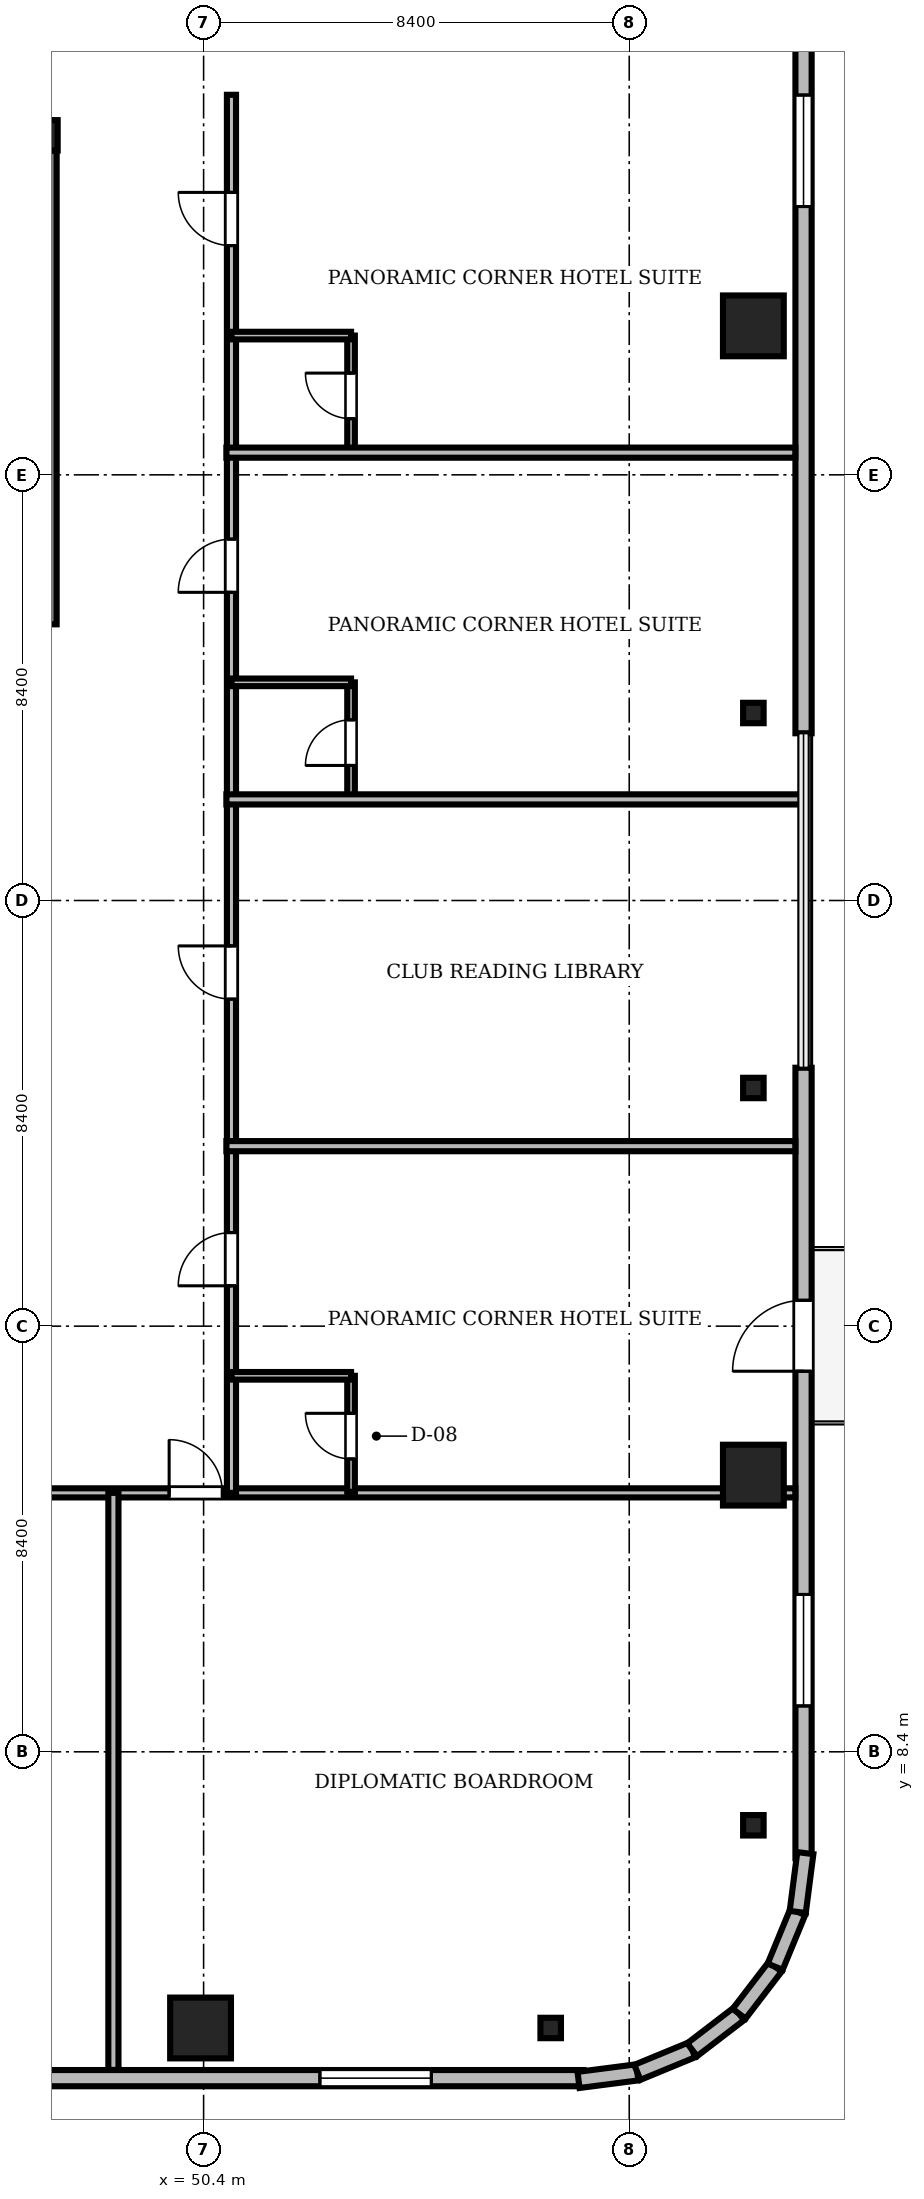
"""IFC4 building model, lengths in metres.
Left out: names, types, materials, properties, quantities, classifications, styles, units other than length and angle.
Written with IfcOpenShell. Run it as: python <this file> out.ifc"""

import sys

from ifc_helpers import new_model, si_unit, direction, frame, frame_2d, origin, origin_2d, place, context, subcontext, project, spatial, rectangle, i_section, extrude, source, transform, mapped, element, fill, save


model = new_model("IFC4")
c1 = context("Model", 3, precision=1e-05, world=origin(), true_north=direction((0.0, 1.0)))
c2 = subcontext(c1, "Body", "Model", "MODEL_VIEW")
j1 = project(units=[si_unit("LENGTHUNIT", "METRE"), si_unit("PLANEANGLEUNIT", "RADIAN")], contexts=[c1])
p1 = place(None, origin())
s1 = spatial("IfcSite", under=j1, at=p1, CompositionType="ELEMENT")
p2 = place(p1, origin())
s2 = spatial("IfcBuilding", under=s1, at=p2, CompositionType="ELEMENT")
p3 = place(p2, frame((0.0, 0.0, 246.65)))
s3 = spatial("IfcBuildingStorey", under=s2, at=p3, CompositionType="ELEMENT", Elevation=246.65)
m1 = source(origin(), c2, "Body", "SweptSolid", [
    extrude(i_section(OverallWidth=0.3, OverallDepth=0.6, WebThickness=0.015, FlangeThickness=0.03, FilletRadius=0.027, at=origin_2d()), origin(), (0.0, 0.0, 1.0), 3.73),
])
p4 = place(p3, frame((47.37, 40.3, 0.0), z_axis=(0.0, 0.0, 1.0), x_axis=(1.0, 0.0, 0.0)))
e1 = element("IfcColumn", 1, at=p4, inside=s3, PredefinedType="COLUMN", context=c2, shape_type="MappedRepresentation", body=[
    mapped(m1, transform((0.0, 0.0, 0.0), scale=1.0)),
])
m2 = source(origin(), c2, "Body", "SweptSolid", [
    extrude(rectangle(XDim=1.2, YDim=1.2, at=origin_2d()), origin(), (0.0, 0.0, 1.0), 3.73),
])
for number, where, z_axis, x_axis in (
    (2, (50.34, 2.95, 0.0), (0.0, 0.0, 1.0), (1.0, 0.0, 0.0)),
    (3, (61.25, 13.86, 0.0), (0.0, 0.0, 1.0), (1.0, 0.0, 0.0)),
    (4, (61.25, 36.54, 0.0), (0.0, 0.0, 1.0), (1.0, 0.0, 0.0)),
):
    element("IfcColumn", number, at=place(p3, frame(where, z_axis=z_axis, x_axis=x_axis)), inside=s3, PredefinedType="COLUMN", context=c2, shape_type="MappedRepresentation", body=[
        mapped(m2, transform((0.0, 0.0, 0.0), scale=1.0)),
    ])
m3 = source(origin(), c2, "Body", "SweptSolid", [
    extrude(i_section(OverallWidth=0.405, OverallDepth=0.403, WebThickness=0.018, FlangeThickness=0.028, FilletRadius=0.015, at=origin_2d()), origin(), (0.0, 0.0, 1.0), 3.73),
])
for number, where, z_axis, x_axis in (
    (5, (57.25, 2.95, 0.0), (0.0, 0.0, 1.0), (1.0, 0.0, 0.0)),
    (6, (61.25, 6.95, 0.0), (0.0, 0.0, 1.0), (1.0, 0.0, 0.0)),
    (7, (61.25, 21.5, 0.0), (0.0, 0.0, 1.0), (1.0, 0.0, 0.0)),
    (8, (61.25, 28.9, 0.0), (0.0, 0.0, 1.0), (1.0, 0.0, 0.0)),
):
    element("IfcColumn", number, at=place(p3, frame(where, z_axis=z_axis, x_axis=x_axis)), inside=s3, PredefinedType="COLUMN", context=c2, shape_type="MappedRepresentation", body=[
        mapped(m3, transform((0.0, 0.0, 0.0), scale=1.0)),
    ])
m4 = source(origin(), c2, "Body", "SweptSolid", [
    extrude(rectangle(XDim=15.6, YDim=0.32, at=frame_2d((7.8, 0.0))), origin(), (0.0, 0.0, 1.0), 3.73),
])
p5 = place(p3, frame((42.3, 1.96, 0.0), z_axis=(0.0, 0.0, 1.0), x_axis=(1.0, 0.0, 0.0)))
e9 = element("IfcWall", 9, at=p5, inside=s3, PredefinedType="SOLIDWALL", context=c2, shape_type="MappedRepresentation", body=[
    mapped(m4, transform((0.0, 0.0, 0.0), scale=1.0)),
])
m5 = source(origin(), c2, "Body", "SweptSolid", [
    extrude(rectangle(XDim=2.2, YDim=2.4, at=frame_2d((1.1, 1.2))), frame((0.0, 0.17, 0.0), z_axis=(0.0, -1.0, 0.0), x_axis=(1.0, 0.0, 0.0)), (0.0, 0.0, 1.0), 0.34),
])
p6 = place(p5, frame((10.395, 0.0, 0.72)))
e10 = element("IfcOpeningElement", 10, at=p6, cuts=e9, PredefinedType="OPENING", context=c2, shape_type="MappedRepresentation", body=[
    mapped(m5, transform((0.0, 0.0, 0.0), scale=1.0)),
])
p7 = place(p3, frame((62.24, 6.3, 0.0), z_axis=(0.0, 0.0, 1.0), x_axis=(0.0, 1.0, 0.0)))
e11 = element("IfcWall", 11, at=p7, inside=s3, PredefinedType="SOLIDWALL", context=c2, shape_type="MappedRepresentation", body=[
    mapped(m4, transform((0.0, 0.0, 0.0), scale=1.0)),
])
m6 = source(origin(), c2, "Body", "SweptSolid", [
    extrude(rectangle(XDim=1.4, YDim=2.3, at=frame_2d((0.7, 1.15))), frame((0.0, 0.17, 0.0), z_axis=(0.0, -1.0, 0.0), x_axis=(1.0, 0.0, 0.0)), (0.0, 0.0, 1.0), 0.34),
])
p8 = place(p7, frame((9.61, 0.0, 0.0)))
e12 = element("IfcOpeningElement", 12, at=p8, cuts=e11, PredefinedType="OPENING", context=c2, shape_type="MappedRepresentation", body=[
    mapped(m6, transform((0.0, 0.0, 0.0), scale=1.0)),
])
p9 = place(p7, frame((3.005, 0.0, 0.72)))
e13 = element("IfcOpeningElement", 13, at=p9, cuts=e11, PredefinedType="OPENING", context=c2, shape_type="MappedRepresentation", body=[
    mapped(m5, transform((0.0, 0.0, 0.0), scale=1.0)),
])
m7 = source(origin(), c2, "Body", "SweptSolid", [
    extrude(rectangle(XDim=15.6, YDim=0.32, at=frame_2d((7.8, 0.0))), origin(), (0.0, 0.0, 1.0), 3.73),
])
p10 = place(p3, frame((62.24, 28.5, 0.0), z_axis=(0.0, 0.0, 1.0), x_axis=(0.0, 1.0, 0.0)))
e14 = element("IfcWall", 14, at=p10, inside=s3, PredefinedType="SOLIDWALL", context=c2, shape_type="MappedRepresentation", body=[
    mapped(m7, transform((0.0, 0.0, 0.0), scale=1.0)),
])
p11 = place(p10, frame((10.395, 0.0, 0.72)))
e15 = element("IfcOpeningElement", 15, at=p11, cuts=e14, PredefinedType="OPENING", context=c2, shape_type="MappedRepresentation", body=[
    mapped(m5, transform((0.0, 0.0, 0.0), scale=1.0)),
])
m8 = source(origin(), c2, "Body", "SweptSolid", [
    extrude(rectangle(XDim=1.17, YDim=0.32, at=frame_2d((0.585, 0.0))), origin(), (0.0, 0.0, 1.0), 3.73),
])
p12 = place(p3, frame((57.8, 1.925, 0.0), z_axis=(0.0, 0.0, 1.0), x_axis=(0.991762485493, 0.128090485085, 0.0)))
e16 = element("IfcWall", 16, at=p12, inside=s3, PredefinedType="SOLIDWALL", context=c2, shape_type="MappedRepresentation", body=[
    mapped(m8, transform((0.0, 0.0, 0.0), scale=1.0)),
])
m9 = source(origin(), c2, "Body", "SweptSolid", [
    extrude(rectangle(XDim=1.169, YDim=0.32, at=frame_2d((0.585, 0.0))), origin(), (0.0, 0.0, 1.0), 3.73),
])
p13 = place(p3, frame((58.96, 2.074, 0.0), z_axis=(0.0, 0.0, 1.0), x_axis=(0.924479075121, 0.381232789334, 0.0)))
e17 = element("IfcWall", 17, at=p13, inside=s3, PredefinedType="SOLIDWALL", context=c2, shape_type="MappedRepresentation", body=[
    mapped(m9, transform((0.0, 0.0, 0.0), scale=1.0)),
])
m10 = source(origin(), c2, "Body", "SweptSolid", [
    extrude(rectangle(XDim=1.169, YDim=0.32, at=frame_2d((0.584, 0.0))), origin(), (0.0, 0.0, 1.0), 3.73),
])
p14 = place(p3, frame((60.041, 2.52, 0.0), z_axis=(0.0, 0.0, 1.0), x_axis=(0.793663520347, 0.608356981114, 0.0)))
e18 = element("IfcWall", 18, at=p14, inside=s3, PredefinedType="SOLIDWALL", context=c2, shape_type="MappedRepresentation", body=[
    mapped(m10, transform((0.0, 0.0, 0.0), scale=1.0)),
])
m11 = source(origin(), c2, "Body", "SweptSolid", [
    extrude(rectangle(XDim=1.169, YDim=0.32, at=frame_2d((0.584, 0.0))), origin(), (0.0, 0.0, 1.0), 3.73),
])
for number, where, z_axis, x_axis in (
    (19, (60.969, 3.231, 0.0), (0.0, 0.0, 1.0), (0.608, 0.794, 0.0)),
    (20, (61.68, 4.159, 0.0), (0.0, 0.0, 1.0), (0.381, 0.925, 0.0)),
):
    element("IfcWall", number, at=place(p3, frame(where, z_axis=z_axis, x_axis=x_axis)), inside=s3, PredefinedType="SOLIDWALL", context=c2, shape_type="MappedRepresentation", body=[
        mapped(m11, transform((0.0, 0.0, 0.0), scale=1.0)),
    ])
m12 = source(origin(), c2, "Body", "SweptSolid", [
    extrude(rectangle(XDim=1.171, YDim=0.32, at=frame_2d((0.585, 0.0))), origin(), (0.0, 0.0, 1.0), 3.73),
])
p15 = place(p3, frame((62.125, 5.24, 0.0), z_axis=(0.0, 0.0, 1.0), x_axis=(0.128269133229, 0.991739395941, 0.0)))
e21 = element("IfcWall", 21, at=p15, inside=s3, PredefinedType="SOLIDWALL", context=c2, shape_type="MappedRepresentation", body=[
    mapped(m12, transform((0.0, 0.0, 0.0), scale=1.0)),
])
m13 = source(origin(), c2, "Body", "SweptSolid", [
    extrude(rectangle(XDim=9.35, YDim=0.25, at=frame_2d((4.675, 0.0))), origin(), (0.0, 0.0, 1.0), 3.75),
])
p16 = place(p3, frame((47.375, 30.65, 0.0), z_axis=(0.0, 0.0, 1.0), x_axis=(0.0, 1.0, 0.0)))
e22 = element("IfcWall", 22, at=p16, inside=s3, PredefinedType="SOLIDWALL", context=c2, shape_type="MappedRepresentation", body=[
    mapped(m13, transform((0.0, 0.0, 0.0), scale=1.0)),
])
m14 = source(origin(), c2, "Body", "SweptSolid", [
    extrude(rectangle(XDim=46.156, YDim=0.18, at=frame_2d((23.078, 0.0))), origin(), (0.0, 0.0, 1.0), 2.972),
])
p17 = place(p3, frame((15.922, 13.51, 0.0), z_axis=(0.0, 0.0, 1.0), x_axis=(1.0, 0.0, 0.0)))
e23 = element("IfcWall", 23, at=p17, inside=s3, PredefinedType="PARTITIONING", context=c2, shape_type="MappedRepresentation", body=[
    mapped(m14, transform((0.0, 0.0, 0.0), scale=1.0)),
])
m15 = source(origin(), c2, "Body", "SweptSolid", [
    extrude(rectangle(XDim=1.05, YDim=2.2, at=frame_2d((0.525, 1.1))), frame((0.0, 0.1, 0.0), z_axis=(0.0, -1.0, 0.0), x_axis=(1.0, 0.0, 0.0)), (0.0, 0.0, 1.0), 0.2),
])
p18 = place(p17, frame((7.298, 0.0, 0.0)))
e24 = element("IfcOpeningElement", 24, at=p18, cuts=e23, PredefinedType="OPENING", context=c2, shape_type="MappedRepresentation", body=[
    mapped(m15, transform((0.0, 0.0, 0.0), scale=1.0)),
])
p19 = place(p17, frame((10.384, 0.0, 0.0)))
e25 = element("IfcOpeningElement", 25, at=p19, cuts=e23, PredefinedType="OPENING", context=c2, shape_type="MappedRepresentation", body=[
    mapped(m15, transform((0.0, 0.0, 0.0), scale=1.0)),
])
p20 = place(p17, frame((15.647, 0.0, 0.0)))
e26 = element("IfcOpeningElement", 26, at=p20, cuts=e23, PredefinedType="OPENING", context=c2, shape_type="MappedRepresentation", body=[
    mapped(m15, transform((0.0, 0.0, 0.0), scale=1.0)),
])
p21 = place(p17, frame((21.659, 0.0, 0.0)))
e27 = element("IfcOpeningElement", 27, at=p21, cuts=e23, PredefinedType="OPENING", context=c2, shape_type="MappedRepresentation", body=[
    mapped(m15, transform((0.0, 0.0, 0.0), scale=1.0)),
])
p22 = place(p17, frame((28.422, 0.0, 0.0)))
e28 = element("IfcOpeningElement", 28, at=p22, cuts=e23, PredefinedType="OPENING", context=c2, shape_type="MappedRepresentation", body=[
    mapped(m15, transform((0.0, 0.0, 0.0), scale=1.0)),
])
p23 = place(p17, frame((33.798, 0.0, 0.0)))
e29 = element("IfcOpeningElement", 29, at=p23, cuts=e23, PredefinedType="OPENING", context=c2, shape_type="MappedRepresentation", body=[
    mapped(m15, transform((0.0, 0.0, 0.0), scale=1.0)),
])
m16 = source(origin(), c2, "Body", "SweptSolid", [
    extrude(rectangle(XDim=27.59, YDim=0.18, at=frame_2d((13.795, 0.0))), origin(), (0.0, 0.0, 1.0), 3.172),
])
p24 = place(p3, frame((50.95, 13.51, 0.0), z_axis=(0.0, 0.0, 1.0), x_axis=(0.0, 1.0, 0.0)))
e30 = element("IfcWall", 30, at=p24, inside=s3, PredefinedType="PARTITIONING", context=c2, shape_type="MappedRepresentation", body=[
    mapped(m16, transform((0.0, 0.0, 0.0), scale=1.0)),
])
p25 = place(p24, frame((4.086, 0.0, 0.0)))
e31 = element("IfcOpeningElement", 31, at=p25, cuts=e30, PredefinedType="OPENING", context=c2, shape_type="MappedRepresentation", body=[
    mapped(m15, transform((0.0, 0.0, 0.0), scale=1.0)),
])
p26 = place(p24, frame((9.744, 0.0, 0.0)))
e32 = element("IfcOpeningElement", 32, at=p26, cuts=e30, PredefinedType="OPENING", context=c2, shape_type="MappedRepresentation", body=[
    mapped(m15, transform((0.0, 0.0, 0.0), scale=1.0)),
])
p27 = place(p24, frame((17.771, 0.0, 0.0)))
e33 = element("IfcOpeningElement", 33, at=p27, cuts=e30, PredefinedType="OPENING", context=c2, shape_type="MappedRepresentation", body=[
    mapped(m15, transform((0.0, 0.0, 0.0), scale=1.0)),
])
p28 = place(p24, frame((24.614, 0.0, 0.0)))
e34 = element("IfcOpeningElement", 34, at=p28, cuts=e30, PredefinedType="OPENING", context=c2, shape_type="MappedRepresentation", body=[
    mapped(m15, transform((0.0, 0.0, 0.0), scale=1.0)),
])
m17 = source(origin(), c2, "Body", "SweptSolid", [
    extrude(rectangle(XDim=2.29, YDim=0.15, at=frame_2d((1.145, 0.0))), origin(), (0.0, 0.0, 1.0), 3.172),
])
p29 = place(p3, frame((53.31, 13.53, 0.0), z_axis=(0.0, 0.0, 1.0), x_axis=(0.0, 1.0, 0.0)))
e35 = element("IfcWall", 35, at=p29, inside=s3, PredefinedType="PARTITIONING", context=c2, shape_type="MappedRepresentation", body=[
    mapped(m17, transform((0.0, 0.0, 0.0), scale=1.0)),
])
m18 = source(origin(), c2, "Body", "SweptSolid", [
    extrude(rectangle(XDim=0.9, YDim=2.1, at=frame_2d((0.45, 1.05))), frame((0.0, 0.085, 0.0), z_axis=(0.0, -1.0, 0.0), x_axis=(1.0, 0.0, 0.0)), (0.0, 0.0, 1.0), 0.17),
])
p30 = place(p29, frame((0.65, 0.0, 0.0)))
e36 = element("IfcOpeningElement", 36, at=p30, cuts=e35, PredefinedType="OPENING", context=c2, shape_type="MappedRepresentation", body=[
    mapped(m18, transform((0.0, 0.0, 0.0), scale=1.0)),
])
m19 = source(origin(), c2, "Body", "SweptSolid", [
    extrude(rectangle(XDim=2.29, YDim=0.15, at=frame_2d((1.145, 0.0))), origin(), (0.0, 0.0, 1.0), 3.73),
])
p31 = place(p3, frame((53.31, 27.215, 0.0), z_axis=(0.0, 0.0, 1.0), x_axis=(0.0, 1.0, 0.0)))
e37 = element("IfcWall", 37, at=p31, inside=s3, PredefinedType="PARTITIONING", context=c2, shape_type="MappedRepresentation", body=[
    mapped(m19, transform((0.0, 0.0, 0.0), scale=1.0)),
])
p32 = place(p31, frame((0.65, 0.0, 0.0)))
e38 = element("IfcOpeningElement", 38, at=p32, cuts=e37, PredefinedType="OPENING", context=c2, shape_type="MappedRepresentation", body=[
    mapped(m18, transform((0.0, 0.0, 0.0), scale=1.0)),
])
p33 = place(p3, frame((53.31, 34.058, 0.0), z_axis=(0.0, 0.0, 1.0), x_axis=(0.0, 1.0, 0.0)))
e39 = element("IfcWall", 39, at=p33, inside=s3, PredefinedType="PARTITIONING", context=c2, shape_type="MappedRepresentation", body=[
    mapped(m19, transform((0.0, 0.0, 0.0), scale=1.0)),
])
p34 = place(p33, frame((0.65, 0.0, 0.0)))
e40 = element("IfcOpeningElement", 40, at=p34, cuts=e39, PredefinedType="OPENING", context=c2, shape_type="MappedRepresentation", body=[
    mapped(m18, transform((0.0, 0.0, 0.0), scale=1.0)),
])
m20 = source(origin(), c2, "Body", "SweptSolid", [
    extrude(rectangle(XDim=11.388, YDim=0.2, at=frame_2d((5.694, 0.0))), origin(), (0.0, 0.0, 1.0), 2.972),
])
p35 = place(p3, frame((48.62, 2.122, 0.0), z_axis=(0.0, 0.0, 1.0), x_axis=(0.0, 1.0, 0.0)))
e41 = element("IfcWall", 41, at=p35, inside=s3, PredefinedType="PARTITIONING", context=c2, shape_type="MappedRepresentation", body=[
    mapped(m20, transform((0.0, 0.0, 0.0), scale=1.0)),
])
m21 = source(origin(), c2, "Body", "SweptSolid", [
    extrude(rectangle(XDim=11.228, YDim=0.2, at=frame_2d((5.614, 0.0))), origin(), (0.0, 0.0, 1.0), 2.972),
])
p36 = place(p3, frame((50.85, 20.352, 0.0), z_axis=(0.0, 0.0, 1.0), x_axis=(1.0, 0.0, 0.0)))
e42 = element("IfcWall", 42, at=p36, inside=s3, PredefinedType="PARTITIONING", context=c2, shape_type="MappedRepresentation", body=[
    mapped(m21, transform((0.0, 0.0, 0.0), scale=1.0)),
])
m22 = source(origin(), c2, "Body", "SweptSolid", [
    extrude(rectangle(XDim=11.42, YDim=0.2, at=frame_2d((5.71, 0.0))), origin(), (0.0, 0.0, 1.0), 2.972),
])
p37 = place(p3, frame((50.85, 27.195, 0.0), z_axis=(0.0, 0.0, 1.0), x_axis=(1.0, 0.0, 0.0)))
e43 = element("IfcWall", 43, at=p37, inside=s3, PredefinedType="PARTITIONING", context=c2, shape_type="MappedRepresentation", body=[
    mapped(m22, transform((0.0, 0.0, 0.0), scale=1.0)),
])
p38 = place(p3, frame((50.85, 34.038, 0.0), z_axis=(0.0, 0.0, 1.0), x_axis=(1.0, 0.0, 0.0)))
e44 = element("IfcWall", 44, at=p38, inside=s3, PredefinedType="PARTITIONING", context=c2, shape_type="MappedRepresentation", body=[
    mapped(m21, transform((0.0, 0.0, 0.0), scale=1.0)),
])
m23 = source(origin(), c2, "Body", "SweptSolid", [
    extrude(rectangle(XDim=2.36, YDim=0.15, at=frame_2d((1.18, 0.0))), origin(), (0.0, 0.0, 1.0), 3.73),
])
for number, where, z_axis, x_axis in (
    (45, (50.95, 15.82, 0.0), (0.0, 0.0, 1.0), (1.0, 0.0, 0.0)),
    (46, (50.95, 29.505, 0.0), (0.0, 0.0, 1.0), (1.0, 0.0, 0.0)),
    (47, (50.95, 36.348, 0.0), (0.0, 0.0, 1.0), (1.0, 0.0, 0.0)),
):
    element("IfcWall", number, at=place(p3, frame(where, z_axis=z_axis, x_axis=x_axis)), inside=s3, PredefinedType="PARTITIONING", context=c2, shape_type="MappedRepresentation", body=[
        mapped(m23, transform((0.0, 0.0, 0.0), scale=1.0)),
    ])
m24 = source(origin(), c2, "Body", "SweptSolid", [
    extrude(rectangle(XDim=2.2, YDim=2.4, at=frame_2d((1.1, 1.2))), frame((0.0, 0.03, 0.0), z_axis=(0.0, -1.0, 0.0), x_axis=(1.0, 0.0, 0.0)), (0.0, 0.0, 1.0), 0.06),
])
p39 = place(p6, origin())
e48 = element("IfcWindow", 48, at=p39, inside=s3, PartitioningType="SINGLE_PANEL", PredefinedType="WINDOW", context=c2, shape_type="MappedRepresentation", body=[
    mapped(m24, transform((0.0, 0.0, 0.0), scale=1.0)),
])
fill(e10, e48)
m25 = source(origin(), c2, "Body", "SweptSolid", [
    extrude(rectangle(XDim=1.4, YDim=2.3, at=frame_2d((0.7, 1.15))), frame((0.0, 0.025, 0.0), z_axis=(0.0, -1.0, 0.0), x_axis=(1.0, 0.0, 0.0)), (0.0, 0.0, 1.0), 0.05),
])
p40 = place(p8, frame((1.4, 0.0, 0.0), z_axis=(0.0, 0.0, 1.0), x_axis=(-1.0, 0.0, 0.0)))
e49 = element("IfcDoor", 49, at=p40, inside=s3, OperationType="DOUBLE_DOOR_SLIDING", PredefinedType="DOOR", context=c2, shape_type="MappedRepresentation", body=[
    mapped(m25, transform((0.0, 0.0, 0.0), scale=1.0)),
])
fill(e12, e49)
p41 = place(p9, origin())
e50 = element("IfcWindow", 50, at=p41, inside=s3, PartitioningType="SINGLE_PANEL", PredefinedType="WINDOW", context=c2, shape_type="MappedRepresentation", body=[
    mapped(m24, transform((0.0, 0.0, 0.0), scale=1.0)),
])
fill(e13, e50)
p42 = place(p11, origin())
e51 = element("IfcWindow", 51, at=p42, inside=s3, PartitioningType="SINGLE_PANEL", PredefinedType="WINDOW", context=c2, shape_type="MappedRepresentation", body=[
    mapped(m24, transform((0.0, 0.0, 0.0), scale=1.0)),
])
fill(e15, e51)
m26 = source(origin(), c2, "Body", "SweptSolid", [
    extrude(rectangle(XDim=1.05, YDim=2.2, at=frame_2d((0.525, 1.1))), frame((0.0, 0.025, 0.0), z_axis=(0.0, -1.0, 0.0), x_axis=(1.0, 0.0, 0.0)), (0.0, 0.0, 1.0), 0.05),
])
p43 = place(p23, origin())
e52 = element("IfcDoor", 52, at=p43, inside=s3, OperationType="SINGLE_SWING_LEFT", PredefinedType="DOOR", context=c2, shape_type="MappedRepresentation", body=[
    mapped(m26, transform((0.0, 0.0, 0.0), scale=1.0)),
])
fill(e29, e52)
p44 = place(p25, origin())
e53 = element("IfcDoor", 53, at=p44, inside=s3, OperationType="SINGLE_SWING_LEFT", PredefinedType="DOOR", context=c2, shape_type="MappedRepresentation", body=[
    mapped(m26, transform((0.0, 0.0, 0.0), scale=1.0)),
])
fill(e31, e53)
p45 = place(p26, origin())
e54 = element("IfcDoor", 54, at=p45, inside=s3, OperationType="SINGLE_SWING_RIGHT", PredefinedType="DOOR", context=c2, shape_type="MappedRepresentation", body=[
    mapped(m26, transform((0.0, 0.0, 0.0), scale=1.0)),
])
fill(e32, e54)
p46 = place(p27, origin())
e55 = element("IfcDoor", 55, at=p46, inside=s3, OperationType="SINGLE_SWING_LEFT", PredefinedType="DOOR", context=c2, shape_type="MappedRepresentation", body=[
    mapped(m26, transform((0.0, 0.0, 0.0), scale=1.0)),
])
fill(e33, e55)
p47 = place(p28, origin())
e56 = element("IfcDoor", 56, at=p47, inside=s3, OperationType="SINGLE_SWING_RIGHT", PredefinedType="DOOR", context=c2, shape_type="MappedRepresentation", body=[
    mapped(m26, transform((0.0, 0.0, 0.0), scale=1.0)),
])
fill(e34, e56)
m27 = source(origin(), c2, "Body", "SweptSolid", [
    extrude(rectangle(XDim=0.9, YDim=2.1, at=frame_2d((0.45, 1.05))), frame((0.0, 0.025, 0.0), z_axis=(0.0, -1.0, 0.0), x_axis=(1.0, 0.0, 0.0)), (0.0, 0.0, 1.0), 0.05),
])
p48 = place(p30, origin())
e57 = element("IfcDoor", 57, at=p48, inside=s3, OperationType="SINGLE_SWING_RIGHT", PredefinedType="DOOR", context=c2, shape_type="MappedRepresentation", body=[
    mapped(m27, transform((0.0, 0.0, 0.0), scale=1.0)),
])
fill(e36, e57)
p49 = place(p32, origin())
e58 = element("IfcDoor", 58, at=p49, inside=s3, OperationType="SINGLE_SWING_LEFT", PredefinedType="DOOR", context=c2, shape_type="MappedRepresentation", body=[
    mapped(m27, transform((0.0, 0.0, 0.0), scale=1.0)),
])
fill(e38, e58)
p50 = place(p34, origin())
e59 = element("IfcDoor", 59, at=p50, inside=s3, OperationType="SINGLE_SWING_RIGHT", PredefinedType="DOOR", context=c2, shape_type="MappedRepresentation", body=[
    mapped(m27, transform((0.0, 0.0, 0.0), scale=1.0)),
])
fill(e40, e59)
save(model, sys.argv[1])
